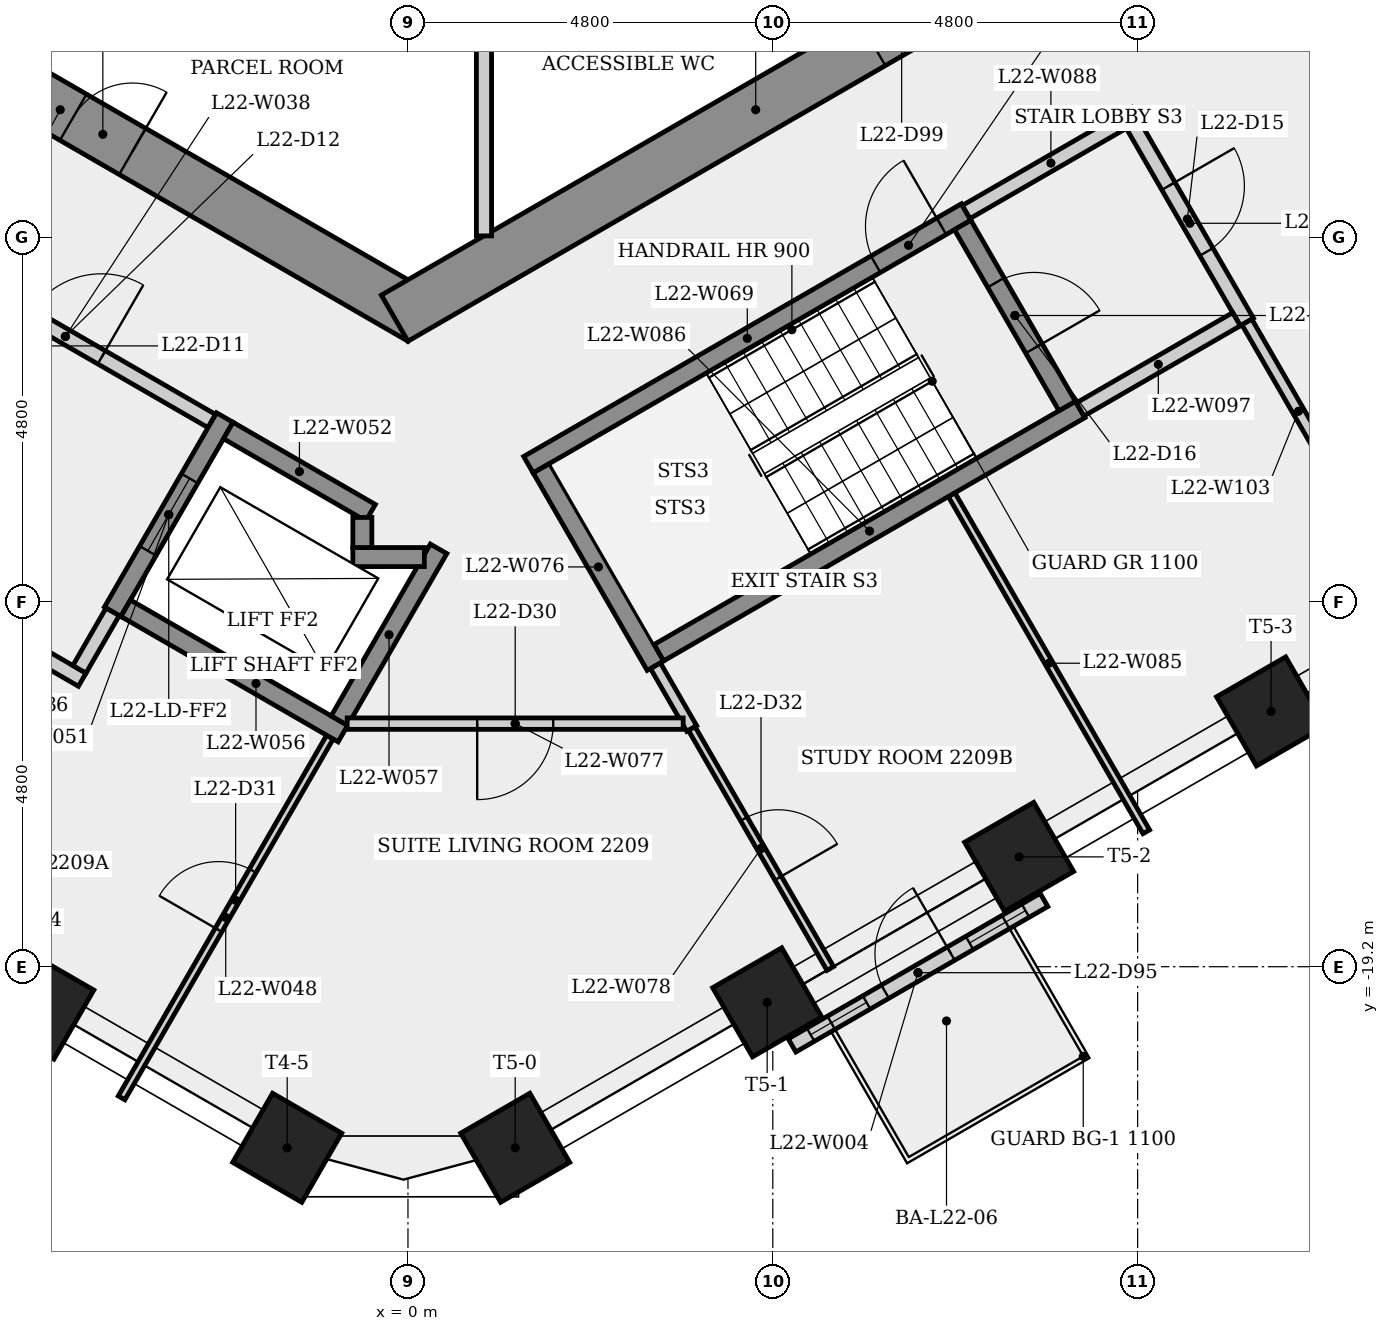
"""IFC4 building model, lengths in metres.
Left out: names, types, materials, properties, quantities, classifications, styles, units other than length and angle.
Written with IfcOpenShell. Run it as: python <this file> out.ifc"""

import sys

from ifc_helpers import new_model, si_unit, direction, frame, frame_2d, origin, origin_2d, place, context, subcontext, project, spatial, rectangle, extrude, element, fill, save


model = new_model("IFC4")
c1 = context("Model", 3, precision=1e-05, world=origin(), true_north=direction((0.0, 1.0)))
c2 = subcontext(c1, "Body", "Model", "MODEL_VIEW")
j1 = project(units=[si_unit("LENGTHUNIT", "METRE"), si_unit("PLANEANGLEUNIT", "RADIAN")], contexts=[c1])
p1 = place(None, origin())
s1 = spatial("IfcSite", under=j1, at=p1, CompositionType="ELEMENT")
p2 = place(p1, origin())
s2 = spatial("IfcBuilding", under=s1, at=p2, CompositionType="ELEMENT")
p3 = place(p2, frame((0.0, 0.0, 86.5)))
s3 = spatial("IfcBuildingStorey", under=s2, at=p3, CompositionType="ELEMENT", Elevation=86.5)
p4 = place(p3, frame((-9.325, -5.182, 0.0), z_axis=(0.0, 0.0, 1.0), x_axis=(0.866023993627, -0.500002442456, 0.0)))
e1 = element("IfcWall", 1, at=p4, inside=s3, PredefinedType="SHEAR", context=c2, shape_type="SweptSolid", body=[
    extrude(rectangle(XDim=10.97, YDim=0.7, at=frame_2d((5.485, 0.0))), origin(), (0.0, 0.0, 1.0), 3.4),
])
p5 = place(p4, frame((5.682, 0.0, 0.0)))
e2 = element("IfcOpeningElement", 2, at=p5, cuts=e1, PredefinedType="OPENING", context=c2, shape_type="SweptSolid", body=[
    extrude(rectangle(XDim=0.9, YDim=2.1, at=frame_2d((0.45, 1.05))), frame((0.0, 0.36, 0.0), z_axis=(0.0, -1.0, 0.0), x_axis=(1.0, 0.0, 0.0)), (0.0, 0.0, 1.0), 0.72),
])
p6 = place(p3, frame((-0.175, -10.667, 0.0), z_axis=(0.0, 0.0, 1.0), x_axis=(0.866023993627, 0.500002442456, 0.0)))
e3 = element("IfcWall", 3, at=p6, inside=s3, PredefinedType="SHEAR", context=c2, shape_type="SweptSolid", body=[
    extrude(rectangle(XDim=10.97, YDim=0.7, at=frame_2d((5.485, 0.0))), origin(), (0.0, 0.0, 1.0), 3.4),
])
p7 = place(p6, frame((7.252, 0.0, 0.0)))
e4 = element("IfcOpeningElement", 4, at=p7, cuts=e3, PredefinedType="OPENING", context=c2, shape_type="SweptSolid", body=[
    extrude(rectangle(XDim=0.9, YDim=2.1, at=frame_2d((0.45, 1.05))), frame((0.0, 0.36, 0.0), z_axis=(0.0, -1.0, 0.0), x_axis=(1.0, 0.0, 0.0)), (0.0, 0.0, 1.0), 0.72),
])
for number, where, z_axis, x_axis in (
    (5, (-4.851, -19.699, 0.0), (0.0, 0.0, 1.0), (-0.5, -0.866, 0.0)),
    (6, (-1.589, -21.583, 0.0), (0.0, 0.0, 1.0), (-0.5, -0.866, 0.0)),
    (7, (1.411, -21.583, 0.0), (0.0, 0.0, 1.0), (0.5, -0.866, 0.0)),
    (8, (4.726, -19.669, 0.0), (0.0, 0.0, 1.0), (0.5, -0.866, 0.0)),
    (9, (8.041, -17.755, 0.0), (0.0, 0.0, 1.0), (0.5, -0.866, 0.0)),
    (10, (11.356, -15.841, 0.0), (0.0, 0.0, 1.0), (0.5, -0.866, 0.0)),
):
    element("IfcColumn", number, at=place(p3, frame(where, z_axis=z_axis, x_axis=x_axis)), inside=s3, PredefinedType="COLUMN", context=c2, shape_type="SweptSolid", body=[
        extrude(rectangle(XDim=1.05, YDim=1.05, at=origin_2d()), origin(), (0.0, 0.0, 1.0), 3.4),
    ])
p8 = place(p3, frame((5.053, -20.236, 0.0), z_axis=(0.0, 0.0, 1.0), x_axis=(0.866020966001, 0.500007686387, 0.0)))
e11 = element("IfcWall", 11, at=p8, inside=s3, PredefinedType="SOLIDWALL", context=c2, shape_type="SweptSolid", body=[
    extrude(rectangle(XDim=3.828, YDim=0.2, at=frame_2d((1.914, 0.0))), origin(), (0.0, 0.0, 1.0), 3.4),
])
p9 = place(p8, frame((1.414, 0.0, 0.0)))
e12 = element("IfcOpeningElement", 12, at=p9, cuts=e11, PredefinedType="OPENING", context=c2, shape_type="SweptSolid", body=[
    extrude(rectangle(XDim=1.0, YDim=2.4, at=frame_2d((0.5, 1.2))), frame((0.0, 0.11, 0.0), z_axis=(0.0, -1.0, 0.0), x_axis=(1.0, 0.0, 0.0)), (0.0, 0.0, 1.0), 0.22),
])
p10 = place(p8, frame((0.282, 0.0, 0.9)))
e13 = element("IfcOpeningElement", 13, at=p10, cuts=e11, PredefinedType="OPENING", context=c2, shape_type="SweptSolid", body=[
    extrude(rectangle(XDim=0.85, YDim=1.5, at=frame_2d((0.425, 0.75))), frame((0.0, 0.11, 0.0), z_axis=(0.0, -1.0, 0.0), x_axis=(1.0, 0.0, 0.0)), (0.0, 0.0, 1.0), 0.22),
])
p11 = place(p8, frame((2.696, 0.0, 0.9)))
e14 = element("IfcOpeningElement", 14, at=p11, cuts=e11, PredefinedType="OPENING", context=c2, shape_type="SweptSolid", body=[
    extrude(rectangle(XDim=0.85, YDim=1.5, at=frame_2d((0.425, 0.75))), frame((0.0, 0.11, 0.0), z_axis=(0.0, -1.0, 0.0), x_axis=(1.0, 0.0, 0.0)), (0.0, 0.0, 1.0), 0.22),
])
p12 = place(p3, frame((-8.356, -13.073, 0.0), z_axis=(0.0, 0.0, 1.0), x_axis=(0.866038532462, -0.499977259774, 0.0)))
e15 = element("IfcWall", 15, at=p12, inside=s3, PredefinedType="PARTITIONING", context=c2, shape_type="SweptSolid", body=[
    extrude(rectangle(XDim=4.7, YDim=0.2, at=frame_2d((2.35, 0.0))), origin(), (0.0, 0.0, 1.0), 3.05),
])
p13 = place(p3, frame((-6.435, -9.795, 0.0), z_axis=(0.0, 0.0, 1.0), x_axis=(0.866012907634, -0.500021643343, 0.0)))
e16 = element("IfcWall", 16, at=p13, inside=s3, PredefinedType="PARTITIONING", context=c2, shape_type="SweptSolid", body=[
    extrude(rectangle(XDim=4.45, YDim=0.2, at=frame_2d((2.225, 0.0))), origin(), (0.0, 0.0, 1.0), 3.05),
])
p14 = place(p13, frame((1.675, 0.0, 0.0)))
e17 = element("IfcOpeningElement", 17, at=p14, cuts=e16, PredefinedType="OPENING", context=c2, shape_type="SweptSolid", body=[
    extrude(rectangle(XDim=1.1, YDim=2.1, at=frame_2d((0.55, 1.05))), frame((0.0, 0.11, 0.0), z_axis=(0.0, -1.0, 0.0), x_axis=(1.0, 0.0, 0.0)), (0.0, 0.0, 1.0), 0.22),
])
p15 = place(p3, frame((-3.885, -14.529, 0.0), z_axis=(0.0, 0.0, 1.0), x_axis=(-0.499859285417, -0.866106630146, 0.0)))
e18 = element("IfcWall", 18, at=p15, inside=s3, PredefinedType="PARTITIONING", context=c2, shape_type="SweptSolid", body=[
    extrude(rectangle(XDim=0.875, YDim=0.2, at=frame_2d((0.438, 0.0))), origin(), (0.0, 0.0, 1.0), 3.05),
])
p16 = place(p3, frame((-3.768, -20.926, 0.0), z_axis=(0.0, 0.0, 1.0), x_axis=(0.499980760091, 0.866036511666, 0.0)))
e19 = element("IfcWall", 19, at=p16, inside=s3, PredefinedType="PARTITIONING", context=c2, shape_type="SweptSolid", body=[
    extrude(rectangle(XDim=5.482, YDim=0.1, at=frame_2d((2.741, 0.0))), origin(), (0.0, 0.0, 1.0), 3.05),
])
p17 = place(p16, frame((2.551, 0.0, 0.0)))
e20 = element("IfcOpeningElement", 20, at=p17, cuts=e19, PredefinedType="OPENING", context=c2, shape_type="SweptSolid", body=[
    extrude(rectangle(XDim=0.9, YDim=2.1, at=frame_2d((0.45, 1.05))), frame((0.0, 0.06, 0.0), z_axis=(0.0, -1.0, 0.0), x_axis=(1.0, 0.0, 0.0)), (0.0, 0.0, 1.0), 0.12),
])
p18 = place(p3, frame((-2.41, -11.974, 0.0), z_axis=(0.0, 0.0, 1.0), x_axis=(-0.500001826776, -0.866024349092, 0.0)))
e21 = element("IfcWall", 21, at=p18, inside=s3, PredefinedType="SHEAR", context=c2, shape_type="SweptSolid", body=[
    extrude(rectangle(XDim=2.95, YDim=0.25, at=frame_2d((1.475, 0.0))), origin(), (0.0, 0.0, 1.0), 3.05),
])
p19 = place(p18, frame((0.925, 0.0, 0.0)))
e22 = element("IfcOpeningElement", 22, at=p19, cuts=e21, PredefinedType="OPENING", context=c2, shape_type="SweptSolid", body=[
    extrude(rectangle(XDim=1.1, YDim=2.1, at=frame_2d((0.55, 1.05))), frame((0.0, 0.135, 0.0), z_axis=(0.0, -1.0, 0.0), x_axis=(1.0, 0.0, 0.0)), (0.0, 0.0, 1.0), 0.27),
])
p20 = place(p3, frame((-2.364, -12.145, 0.0), z_axis=(0.0, 0.0, 1.0), x_axis=(0.86603892542, -0.499976579108, 0.0)))
e23 = element("IfcWall", 23, at=p20, inside=s3, PredefinedType="SHEAR", context=c2, shape_type="SweptSolid", body=[
    extrude(rectangle(XDim=2.162, YDim=0.25, at=frame_2d((1.081, 0.0))), origin(), (0.0, 0.0, 1.0), 3.05),
])
p21 = place(p3, frame((-0.856, -16.133, 0.0), z_axis=(0.0, 0.0, 1.0), x_axis=(-0.866021716278, 0.500006386895, 0.0)))
e24 = element("IfcWall", 24, at=p21, inside=s3, PredefinedType="SHEAR", context=c2, shape_type="SweptSolid", body=[
    extrude(rectangle(XDim=3.3, YDim=0.25, at=frame_2d((1.65, 0.0))), origin(), (0.0, 0.0, 1.0), 3.05),
])
p22 = place(p3, frame((-0.902, -15.962, 0.0), z_axis=(0.0, 0.0, 1.0), x_axis=(0.499981517636, 0.866036074319, 0.0)))
e25 = element("IfcWall", 25, at=p22, inside=s3, PredefinedType="SHEAR", context=c2, shape_type="SweptSolid", body=[
    extrude(rectangle(XDim=2.61, YDim=0.25, at=frame_2d((1.305, 0.0))), origin(), (0.0, 0.0, 1.0), 3.05),
])
p23 = place(p3, frame((-0.725, -13.81, 0.0), z_axis=(0.0, 0.0, 1.0), x_axis=(1.0, 0.0, 0.0)))
e26 = element("IfcWall", 26, at=p23, inside=s3, PredefinedType="SHEAR", context=c2, shape_type="SweptSolid", body=[
    extrude(rectangle(XDim=0.941, YDim=0.25, at=frame_2d((0.47, 0.0))), origin(), (0.0, 0.0, 1.0), 3.4),
])
p24 = place(p3, frame((-0.6, -13.289, 0.0), z_axis=(0.0, 0.0, 1.0), x_axis=(0.0, -1.0, 0.0)))
e27 = element("IfcWall", 27, at=p24, inside=s3, PredefinedType="SHEAR", context=c2, shape_type="SweptSolid", body=[
    extrude(rectangle(XDim=0.396, YDim=0.25, at=frame_2d((0.198, 0.0))), origin(), (0.0, 0.0, 1.0), 3.4),
])
p25 = place(p3, frame((1.0, -5.275, 0.0), z_axis=(0.0, 0.0, 1.0), x_axis=(0.0, -1.0, 0.0)))
e28 = element("IfcWall", 28, at=p25, inside=s3, PredefinedType="PARTITIONING", context=c2, shape_type="SweptSolid", body=[
    extrude(rectangle(XDim=4.309, YDim=0.2, at=frame_2d((2.155, 0.0))), origin(), (0.0, 0.0, 1.0), 3.05),
])
p26 = place(p3, frame((1.585, -12.595, 0.0), z_axis=(0.0, 0.0, 1.0), x_axis=(0.866036417653, 0.499980922934, 0.0)))
e29 = element("IfcWall", 29, at=p26, inside=s3, PredefinedType="SHEAR", context=c2, shape_type="SweptSolid", body=[
    extrude(rectangle(XDim=6.65, YDim=0.25, at=frame_2d((3.325, 0.0))), origin(), (0.0, 0.0, 1.0), 3.05),
])
p27 = place(p26, frame((5.275, 0.0, 0.0)))
e30 = element("IfcOpeningElement", 30, at=p27, cuts=e29, PredefinedType="OPENING", context=c2, shape_type="SweptSolid", body=[
    extrude(rectangle(XDim=1.0, YDim=2.1, at=frame_2d((0.5, 1.05))), frame((0.0, 0.135, 0.0), z_axis=(0.0, -1.0, 0.0), x_axis=(1.0, 0.0, 0.0)), (0.0, 0.0, 1.0), 0.27),
])
p28 = place(p3, frame((3.256, -15.239, 0.0), z_axis=(0.0, 0.0, 1.0), x_axis=(0.499847746334, -0.866113289636, 0.0)))
e31 = element("IfcWall", 31, at=p28, inside=s3, PredefinedType="PARTITIONING", context=c2, shape_type="SweptSolid", body=[
    extrude(rectangle(XDim=0.956, YDim=0.15, at=frame_2d((0.478, 0.0))), origin(), (0.0, 0.0, 1.0), 3.05),
])
p29 = place(p3, frame((3.256, -15.239, 0.0), z_axis=(0.0, 0.0, 1.0), x_axis=(-0.50002537861, 0.866010750942, 0.0)))
e32 = element("IfcWall", 32, at=p29, inside=s3, PredefinedType="SHEAR", context=c2, shape_type="SweptSolid", body=[
    extrude(rectangle(XDim=3.0, YDim=0.25, at=frame_2d((1.5, 0.0))), origin(), (0.0, 0.0, 1.0), 3.05),
])
p30 = place(p3, frame((3.621, -16.002, 0.0), z_axis=(0.0, 0.0, 1.0), x_axis=(-1.0, 0.0, 0.0)))
e33 = element("IfcWall", 33, at=p30, inside=s3, PredefinedType="PARTITIONING", context=c2, shape_type="SweptSolid", body=[
    extrude(rectangle(XDim=4.421, YDim=0.15, at=frame_2d((2.21, 0.0))), origin(), (0.0, 0.0, 1.0), 3.05),
])
p31 = place(p30, frame((1.71, 0.0, 0.0)))
e34 = element("IfcOpeningElement", 34, at=p31, cuts=e33, PredefinedType="OPENING", context=c2, shape_type="SweptSolid", body=[
    extrude(rectangle(XDim=1.0, YDim=2.1, at=frame_2d((0.5, 1.05))), frame((0.0, 0.085, 0.0), z_axis=(0.0, -1.0, 0.0), x_axis=(1.0, 0.0, 0.0)), (0.0, 0.0, 1.0), 0.17),
])
p32 = place(p3, frame((3.733, -16.067, 0.0), z_axis=(0.0, 0.0, 1.0), x_axis=(0.500014248385, -0.866017177319, 0.0)))
e35 = element("IfcWall", 35, at=p32, inside=s3, PredefinedType="PARTITIONING", context=c2, shape_type="SweptSolid", body=[
    extrude(rectangle(XDim=3.646, YDim=0.1, at=frame_2d((1.823, 0.0))), origin(), (0.0, 0.0, 1.0), 3.05),
])
p33 = place(p32, frame((1.373, 0.0, 0.0)))
e36 = element("IfcOpeningElement", 36, at=p33, cuts=e35, PredefinedType="OPENING", context=c2, shape_type="SweptSolid", body=[
    extrude(rectangle(XDim=0.9, YDim=2.1, at=frame_2d((0.45, 1.05))), frame((0.0, 0.06, 0.0), z_axis=(0.0, -1.0, 0.0), x_axis=(1.0, 0.0, 0.0)), (0.0, 0.0, 1.0), 0.12),
])
p34 = place(p3, frame((7.153, -12.989, 0.0), z_axis=(0.0, 0.0, 1.0), x_axis=(0.50001950338, -0.86601414321, 0.0)))
e37 = element("IfcWall", 37, at=p34, inside=s3, PredefinedType="PARTITIONING", context=c2, shape_type="SweptSolid", body=[
    extrude(rectangle(XDim=5.122, YDim=0.1, at=frame_2d((2.561, 0.0))), origin(), (0.0, 0.0, 1.0), 3.05),
])
p35 = place(p3, frame((3.301, -15.068, 0.0), z_axis=(0.0, 0.0, 1.0), x_axis=(0.866035036182, 0.499983315828, 0.0)))
e38 = element("IfcWall", 38, at=p35, inside=s3, PredefinedType="SHEAR", context=c2, shape_type="SweptSolid", body=[
    extrude(rectangle(XDim=6.4, YDim=0.25, at=frame_2d((3.2, 0.0))), origin(), (0.0, 0.0, 1.0), 3.05),
])
p36 = place(p3, frame((7.298, -9.441, 0.0), z_axis=(0.0, 0.0, 1.0), x_axis=(0.500034990121, -0.866005201286, 0.0)))
e39 = element("IfcWall", 39, at=p36, inside=s3, PredefinedType="SHEAR", context=c2, shape_type="SweptSolid", body=[
    extrude(rectangle(XDim=2.75, YDim=0.25, at=frame_2d((1.375, 0.0))), origin(), (0.0, 0.0, 1.0), 3.05),
])
p37 = place(p36, frame((0.875, 0.0, 0.0)))
e40 = element("IfcOpeningElement", 40, at=p37, cuts=e39, PredefinedType="OPENING", context=c2, shape_type="SweptSolid", body=[
    extrude(rectangle(XDim=1.0, YDim=2.1, at=frame_2d((0.5, 1.05))), frame((0.0, 0.135, 0.0), z_axis=(0.0, -1.0, 0.0), x_axis=(1.0, 0.0, 0.0)), (0.0, 0.0, 1.0), 0.27),
])
p38 = place(p3, frame((7.344, -9.27, 0.0), z_axis=(0.0, 0.0, 1.0), x_axis=(0.866005588531, 0.500034319456, 0.0)))
e41 = element("IfcWall", 41, at=p38, inside=s3, PredefinedType="PARTITIONING", context=c2, shape_type="SweptSolid", body=[
    extrude(rectangle(XDim=2.575, YDim=0.2, at=frame_2d((1.288, 0.0))), origin(), (0.0, 0.0, 1.0), 3.05),
])
p39 = place(p3, frame((9.537, -8.119, 0.0), z_axis=(0.0, 0.0, 1.0), x_axis=(0.499990139034, -0.866031096941, 0.0)))
e42 = element("IfcWall", 42, at=p39, inside=s3, PredefinedType="PARTITIONING", context=c2, shape_type="SweptSolid", body=[
    extrude(rectangle(XDim=3.0, YDim=0.2, at=frame_2d((1.5, 0.0))), origin(), (0.0, 0.0, 1.0), 3.05),
])
p40 = place(p39, frame((0.935, 0.0, 0.0)))
e43 = element("IfcOpeningElement", 43, at=p40, cuts=e42, PredefinedType="OPENING", context=c2, shape_type="SweptSolid", body=[
    extrude(rectangle(XDim=1.0, YDim=2.1, at=frame_2d((0.5, 1.05))), frame((0.0, 0.11, 0.0), z_axis=(0.0, -1.0, 0.0), x_axis=(1.0, 0.0, 0.0)), (0.0, 0.0, 1.0), 0.22),
])
p41 = place(p3, frame((10.901, -10.681, 0.0), z_axis=(0.0, 0.0, 1.0), x_axis=(-0.866007538022, -0.500030943131, 0.0)))
e44 = element("IfcWall", 44, at=p41, inside=s3, PredefinedType="PARTITIONING", context=c2, shape_type="SweptSolid", body=[
    extrude(rectangle(XDim=2.375, YDim=0.2, at=frame_2d((1.188, 0.0))), origin(), (0.0, 0.0, 1.0), 3.05),
])
p42 = place(p3, frame((12.394, -13.067, 0.0), z_axis=(0.0, 0.0, 1.0), x_axis=(-0.499971721724, 0.866041729639, 0.0)))
e45 = element("IfcWall", 45, at=p42, inside=s3, PredefinedType="PARTITIONING", context=c2, shape_type="SweptSolid", body=[
    extrude(rectangle(XDim=2.713, YDim=0.15, at=frame_2d((1.356, 0.0))), origin(), (0.0, 0.0, 1.0), 3.05),
])
p43 = place(p9, origin())
e46 = element("IfcDoor", 46, at=p43, inside=s3, OperationType="SINGLE_SWING_RIGHT", PredefinedType="DOOR", context=c2, shape_type="SweptSolid", body=[
    extrude(rectangle(XDim=1.0, YDim=2.4, at=frame_2d((0.5, 1.2))), frame((0.0, 0.025, 0.0), z_axis=(0.0, -1.0, 0.0), x_axis=(1.0, 0.0, 0.0)), (0.0, 0.0, 1.0), 0.05),
])
fill(e12, e46)
p44 = place(p10, origin())
e47 = element("IfcWindow", 47, at=p44, inside=s3, PartitioningType="SINGLE_PANEL", PredefinedType="WINDOW", context=c2, shape_type="SweptSolid", body=[
    extrude(rectangle(XDim=0.85, YDim=1.5, at=frame_2d((0.425, 0.75))), frame((0.0, 0.03, 0.0), z_axis=(0.0, -1.0, 0.0), x_axis=(1.0, 0.0, 0.0)), (0.0, 0.0, 1.0), 0.06),
])
fill(e13, e47)
p45 = place(p11, origin())
e48 = element("IfcWindow", 48, at=p45, inside=s3, PartitioningType="SINGLE_PANEL", PredefinedType="WINDOW", context=c2, shape_type="SweptSolid", body=[
    extrude(rectangle(XDim=0.85, YDim=1.5, at=frame_2d((0.425, 0.75))), frame((0.0, 0.03, 0.0), z_axis=(0.0, -1.0, 0.0), x_axis=(1.0, 0.0, 0.0)), (0.0, 0.0, 1.0), 0.06),
])
fill(e14, e48)
p46 = place(p14, origin())
e49 = element("IfcDoor", 49, at=p46, inside=s3, OperationType="SINGLE_SWING_RIGHT", PredefinedType="DOOR", context=c2, shape_type="SweptSolid", body=[
    extrude(rectangle(XDim=1.1, YDim=2.1, at=frame_2d((0.55, 1.05))), frame((0.0, 0.025, 0.0), z_axis=(0.0, -1.0, 0.0), x_axis=(1.0, 0.0, 0.0)), (0.0, 0.0, 1.0), 0.05),
])
fill(e17, e49)
p47 = place(p19, origin())
e50 = element("IfcDoor", 50, at=p47, inside=s3, OperationType="SLIDING_TO_LEFT", PredefinedType="DOOR", context=c2, shape_type="SweptSolid", body=[
    extrude(rectangle(XDim=1.1, YDim=2.1, at=frame_2d((0.55, 1.05))), frame((0.0, 0.025, 0.0), z_axis=(0.0, -1.0, 0.0), x_axis=(1.0, 0.0, 0.0)), (0.0, 0.0, 1.0), 0.05),
])
fill(e22, e50)
p48 = place(p27, origin())
e51 = element("IfcDoor", 51, at=p48, inside=s3, OperationType="SINGLE_SWING_RIGHT", PredefinedType="DOOR", context=c2, shape_type="SweptSolid", body=[
    extrude(rectangle(XDim=1.0, YDim=2.1, at=frame_2d((0.5, 1.05))), frame((0.0, 0.025, 0.0), z_axis=(0.0, -1.0, 0.0), x_axis=(1.0, 0.0, 0.0)), (0.0, 0.0, 1.0), 0.05),
])
fill(e30, e51)
p49 = place(p40, origin())
e52 = element("IfcDoor", 52, at=p49, inside=s3, OperationType="SINGLE_SWING_LEFT", PredefinedType="DOOR", context=c2, shape_type="SweptSolid", body=[
    extrude(rectangle(XDim=1.0, YDim=2.1, at=frame_2d((0.5, 1.05))), frame((0.0, 0.025, 0.0), z_axis=(0.0, -1.0, 0.0), x_axis=(1.0, 0.0, 0.0)), (0.0, 0.0, 1.0), 0.05),
])
fill(e43, e52)
p50 = place(p37, origin())
e53 = element("IfcDoor", 53, at=p50, inside=s3, OperationType="SINGLE_SWING_RIGHT", PredefinedType="DOOR", context=c2, shape_type="SweptSolid", body=[
    extrude(rectangle(XDim=1.0, YDim=2.1, at=frame_2d((0.5, 1.05))), frame((0.0, 0.025, 0.0), z_axis=(0.0, -1.0, 0.0), x_axis=(1.0, 0.0, 0.0)), (0.0, 0.0, 1.0), 0.05),
])
fill(e40, e53)
p51 = place(p31, origin())
e54 = element("IfcDoor", 54, at=p51, inside=s3, OperationType="SINGLE_SWING_RIGHT", PredefinedType="DOOR", context=c2, shape_type="SweptSolid", body=[
    extrude(rectangle(XDim=1.0, YDim=2.1, at=frame_2d((0.5, 1.05))), frame((0.0, 0.025, 0.0), z_axis=(0.0, -1.0, 0.0), x_axis=(1.0, 0.0, 0.0)), (0.0, 0.0, 1.0), 0.05),
])
fill(e34, e54)
p52 = place(p17, origin())
e55 = element("IfcDoor", 55, at=p52, inside=s3, OperationType="SINGLE_SWING_LEFT", PredefinedType="DOOR", context=c2, shape_type="SweptSolid", body=[
    extrude(rectangle(XDim=0.9, YDim=2.1, at=frame_2d((0.45, 1.05))), frame((0.0, 0.025, 0.0), z_axis=(0.0, -1.0, 0.0), x_axis=(1.0, 0.0, 0.0)), (0.0, 0.0, 1.0), 0.05),
])
fill(e20, e55)
p53 = place(p33, origin())
e56 = element("IfcDoor", 56, at=p53, inside=s3, OperationType="SINGLE_SWING_RIGHT", PredefinedType="DOOR", context=c2, shape_type="SweptSolid", body=[
    extrude(rectangle(XDim=0.9, YDim=2.1, at=frame_2d((0.45, 1.05))), frame((0.0, 0.025, 0.0), z_axis=(0.0, -1.0, 0.0), x_axis=(1.0, 0.0, 0.0)), (0.0, 0.0, 1.0), 0.05),
])
fill(e36, e56)
p54 = place(p5, origin())
e57 = element("IfcDoor", 57, at=p54, inside=s3, OperationType="SINGLE_SWING_RIGHT", PredefinedType="DOOR", context=c2, shape_type="SweptSolid", body=[
    extrude(rectangle(XDim=0.9, YDim=2.1, at=frame_2d((0.45, 1.05))), frame((0.0, 0.025, 0.0), z_axis=(0.0, -1.0, 0.0), x_axis=(1.0, 0.0, 0.0)), (0.0, 0.0, 1.0), 0.05),
])
fill(e2, e57)
save(model, sys.argv[1])
